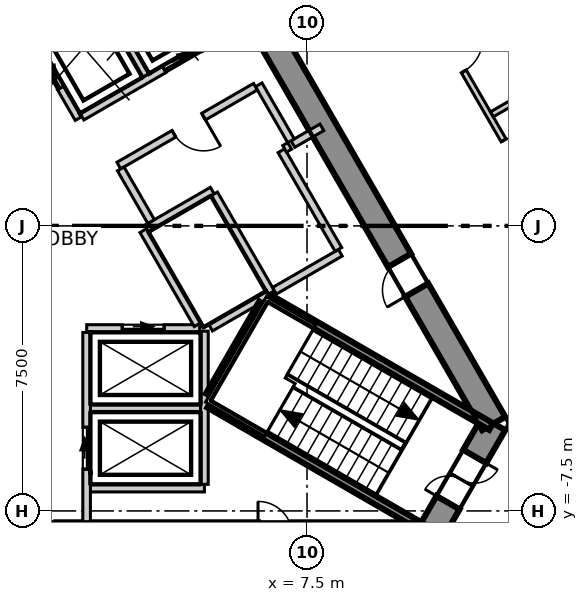
"""IFC4 building model, lengths in metres.
Left out: names, types, materials, properties, quantities, classifications, styles, units other than length and angle.
Written with IfcOpenShell. Run it as: python <this file> out.ifc"""

import sys

from ifc_helpers import new_model, si_unit, direction, frame, frame_2d, origin, place, context, subcontext, project, spatial, polyline, rectangle, outline, extrude, element, fill, save


model = new_model("IFC4")
c1 = context("Model", 3, precision=1e-05, world=origin(), true_north=direction((0.0, 1.0)))
c2 = subcontext(c1, "Body", "Model", "MODEL_VIEW")
j1 = project(units=[si_unit("LENGTHUNIT", "METRE"), si_unit("PLANEANGLEUNIT", "RADIAN")], contexts=[c1])
p1 = place(None, origin())
s1 = spatial("IfcSite", under=j1, at=p1, CompositionType="ELEMENT")
p2 = place(p1, origin())
s2 = spatial("IfcBuilding", under=s1, at=p2, CompositionType="ELEMENT")
p3 = place(p2, frame((0.0, 0.0, 215.3)))
s3 = spatial("IfcBuildingStorey", under=s2, at=p3, CompositionType="ELEMENT", Elevation=215.3)
p4 = place(p3, frame((-10.71, -8.15, -0.3), z_axis=(0.0, 0.0, 1.0), x_axis=(1.0, 0.0, 0.0)))
e1 = element("IfcWall", 1, at=p4, inside=s3, PredefinedType="SHEAR", context=c2, shape_type="SweptSolid", body=[
    extrude(outline(polyline([(-0.202, -0.35), (1.782, -0.35), (3.766, -0.35), (5.75, -0.35), (7.734, -0.35), (9.718, -0.35), (11.702, -0.35), (13.686, -0.35), (15.67, -0.35), (17.654, -0.35), (19.638, -0.35), (21.622, -0.35), (21.218, 0.35), (19.307, 0.35), (17.397, 0.35), (15.486, 0.35), (13.576, 0.35), (11.665, 0.35), (9.755, 0.35), (7.844, 0.35), (5.934, 0.35), (4.023, 0.35), (2.113, 0.35), (0.202, 0.35), (-0.202, -0.35)])), origin(), (0.0, 0.0, 1.0), 4.0),
])
p5 = place(p4, frame((9.81, 0.0, 0.3)))
e2 = element("IfcOpeningElement", 2, at=p5, cuts=e1, PredefinedType="OPENING", context=c2, shape_type="SweptSolid", body=[
    extrude(rectangle(XDim=1.8, YDim=2.1, at=frame_2d((0.9, 1.05))), frame((0.0, 0.36, 0.0), z_axis=(0.0, -1.0, 0.0), x_axis=(1.0, 0.0, 0.0)), (0.0, 0.0, 1.0), 0.72),
])
p6 = place(p4, frame((16.921, 0.0, 0.3)))
e3 = element("IfcOpeningElement", 3, at=p6, cuts=e1, PredefinedType="OPENING", context=c2, shape_type="SweptSolid", body=[
    extrude(rectangle(XDim=0.9, YDim=2.1, at=frame_2d((0.45, 1.05))), frame((0.0, 0.36, 0.0), z_axis=(0.0, -1.0, 0.0), x_axis=(1.0, 0.0, 0.0)), (0.0, 0.0, 1.0), 0.72),
])
p7 = place(p3, frame((10.71, -8.15, -0.3), z_axis=(0.0, 0.0, 1.0), x_axis=(0.49999337185, 0.866029230515, 0.0)))
e4 = element("IfcWall", 4, at=p7, inside=s3, PredefinedType="SHEAR", context=c2, shape_type="SweptSolid", body=[
    extrude(outline(polyline([(-0.202, -0.35), (1.703, -0.35), (3.608, -0.35), (3.204, 0.35), (1.703, 0.35), (0.202, 0.35), (-0.202, -0.35)])), origin(), (0.0, 0.0, 1.0), 4.0),
])
p8 = place(p7, frame((1.003, 0.0, 0.3)))
e5 = element("IfcOpeningElement", 5, at=p8, cuts=e4, PredefinedType="OPENING", context=c2, shape_type="SweptSolid", body=[
    extrude(rectangle(XDim=1.4, YDim=2.1, at=frame_2d((0.7, 1.05))), frame((0.0, 0.36, 0.0), z_axis=(0.0, -1.0, 0.0), x_axis=(1.0, 0.0, 0.0)), (0.0, 0.0, 1.0), 0.72),
])
p9 = place(p3, frame((12.413, -5.2, -0.3), z_axis=(0.0, 0.0, 1.0), x_axis=(-0.500011533395, 0.866018744874, 0.0)))
e6 = element("IfcWall", 6, at=p9, inside=s3, PredefinedType="SHEAR", context=c2, shape_type="SweptSolid", body=[
    extrude(outline(polyline([(-0.202, -0.35), (1.782, -0.35), (3.766, -0.35), (5.75, -0.35), (7.734, -0.35), (9.718, -0.35), (11.702, -0.35), (13.686, -0.35), (15.67, -0.35), (17.654, -0.35), (19.638, -0.35), (21.622, -0.35), (21.218, 0.35), (19.307, 0.35), (17.397, 0.35), (15.486, 0.35), (13.576, 0.35), (11.665, 0.35), (9.755, 0.35), (7.844, 0.35), (5.934, 0.35), (4.023, 0.35), (2.113, 0.35), (0.202, 0.35), (-0.202, -0.35)])), origin(), (0.0, 0.0, 1.0), 4.0),
])
p10 = place(p9, frame((4.055, 0.0, 0.3)))
e7 = element("IfcOpeningElement", 7, at=p10, cuts=e6, PredefinedType="OPENING", context=c2, shape_type="SweptSolid", body=[
    extrude(rectangle(XDim=0.9, YDim=2.1, at=frame_2d((0.45, 1.05))), frame((0.0, 0.36, 0.0), z_axis=(0.0, -1.0, 0.0), x_axis=(1.0, 0.0, 0.0)), (0.0, 0.0, 1.0), 0.72),
])
p11 = place(p9, frame((16.465, 0.0, 0.3)))
e8 = element("IfcOpeningElement", 8, at=p11, cuts=e6, PredefinedType="OPENING", context=c2, shape_type="SweptSolid", body=[
    extrude(rectangle(XDim=0.9, YDim=2.1, at=frame_2d((0.45, 1.05))), frame((0.0, 0.36, 0.0), z_axis=(0.0, -1.0, 0.0), x_axis=(1.0, 0.0, 0.0)), (0.0, 0.0, 1.0), 0.72),
])
p12 = place(p3, frame((28.243, -13.098, 0.0), z_axis=(0.0, 0.0, 1.0), x_axis=(-0.500001688958, 0.866024428662, 0.0)))
e9 = element("IfcWall", 9, at=p12, inside=s3, PredefinedType="ELEMENTEDWALL", context=c2, shape_type="SweptSolid", body=[
    extrude(rectangle(XDim=50.909, YDim=0.2, at=frame_2d((25.455, 0.0))), origin(), (0.0, 0.0, 1.0), 3.7),
])
p13 = place(p12, frame((2.223, 0.0, 0.9)))
e10 = element("IfcOpeningElement", 10, at=p13, cuts=e9, PredefinedType="OPENING", context=c2, shape_type="SweptSolid", body=[
    extrude(rectangle(XDim=4.2, YDim=2.5, at=frame_2d((2.1, 1.25))), frame((0.0, 0.11, 0.0), z_axis=(0.0, -1.0, 0.0), x_axis=(1.0, 0.0, 0.0)), (0.0, 0.0, 1.0), 0.22),
])
p14 = place(p12, frame((8.263, 0.0, 0.9)))
e11 = element("IfcOpeningElement", 11, at=p14, cuts=e9, PredefinedType="OPENING", context=c2, shape_type="SweptSolid", body=[
    extrude(rectangle(XDim=4.2, YDim=2.5, at=frame_2d((2.1, 1.25))), frame((0.0, 0.11, 0.0), z_axis=(0.0, -1.0, 0.0), x_axis=(1.0, 0.0, 0.0)), (0.0, 0.0, 1.0), 0.22),
])
p15 = place(p12, frame((14.304, 0.0, 0.9)))
e12 = element("IfcOpeningElement", 12, at=p15, cuts=e9, PredefinedType="OPENING", context=c2, shape_type="SweptSolid", body=[
    extrude(rectangle(XDim=4.2, YDim=2.5, at=frame_2d((2.1, 1.25))), frame((0.0, 0.11, 0.0), z_axis=(0.0, -1.0, 0.0), x_axis=(1.0, 0.0, 0.0)), (0.0, 0.0, 1.0), 0.22),
])
p16 = place(p12, frame((20.345, 0.0, 0.9)))
e13 = element("IfcOpeningElement", 13, at=p16, cuts=e9, PredefinedType="OPENING", context=c2, shape_type="SweptSolid", body=[
    extrude(rectangle(XDim=4.2, YDim=2.5, at=frame_2d((2.1, 1.25))), frame((0.0, 0.11, 0.0), z_axis=(0.0, -1.0, 0.0), x_axis=(1.0, 0.0, 0.0)), (0.0, 0.0, 1.0), 0.22),
])
p17 = place(p12, frame((26.385, 0.0, 0.9)))
e14 = element("IfcOpeningElement", 14, at=p17, cuts=e9, PredefinedType="OPENING", context=c2, shape_type="SweptSolid", body=[
    extrude(rectangle(XDim=4.2, YDim=2.5, at=frame_2d((2.1, 1.25))), frame((0.0, 0.11, 0.0), z_axis=(0.0, -1.0, 0.0), x_axis=(1.0, 0.0, 0.0)), (0.0, 0.0, 1.0), 0.22),
])
p18 = place(p12, frame((32.426, 0.0, 0.9)))
e15 = element("IfcOpeningElement", 15, at=p18, cuts=e9, PredefinedType="OPENING", context=c2, shape_type="SweptSolid", body=[
    extrude(rectangle(XDim=4.2, YDim=2.5, at=frame_2d((2.1, 1.25))), frame((0.0, 0.11, 0.0), z_axis=(0.0, -1.0, 0.0), x_axis=(1.0, 0.0, 0.0)), (0.0, 0.0, 1.0), 0.22),
])
p19 = place(p12, frame((38.466, 0.0, 0.9)))
e16 = element("IfcOpeningElement", 16, at=p19, cuts=e9, PredefinedType="OPENING", context=c2, shape_type="SweptSolid", body=[
    extrude(rectangle(XDim=4.2, YDim=2.5, at=frame_2d((2.1, 1.25))), frame((0.0, 0.11, 0.0), z_axis=(0.0, -1.0, 0.0), x_axis=(1.0, 0.0, 0.0)), (0.0, 0.0, 1.0), 0.22),
])
p20 = place(p12, frame((44.507, 0.0, 0.9)))
e17 = element("IfcOpeningElement", 17, at=p20, cuts=e9, PredefinedType="OPENING", context=c2, shape_type="SweptSolid", body=[
    extrude(rectangle(XDim=4.2, YDim=2.5, at=frame_2d((2.1, 1.25))), frame((0.0, 0.11, 0.0), z_axis=(0.0, -1.0, 0.0), x_axis=(1.0, 0.0, 0.0)), (0.0, 0.0, 1.0), 0.22),
])
p21 = place(p3, frame((0.075, 24.07, 0.0), z_axis=(0.0, 0.0, 1.0), x_axis=(0.500006834213, -0.866021458014, 0.0)))
e18 = element("IfcWall", 18, at=p21, inside=s3, PredefinedType="PARTITIONING", context=c2, shape_type="SweptSolid", body=[
    extrude(rectangle(XDim=41.616, YDim=0.15, at=frame_2d((20.808, 0.0))), origin(), (0.0, 0.0, 1.0), 3.7),
])
p22 = place(p21, frame((33.715, 0.0, 0.0)))
e19 = element("IfcOpeningElement", 19, at=p22, cuts=e18, PredefinedType="OPENING", context=c2, shape_type="SweptSolid", body=[
    extrude(rectangle(XDim=1.1, YDim=2.1, at=frame_2d((0.55, 1.05))), frame((0.0, 0.085, 0.0), z_axis=(0.0, -1.0, 0.0), x_axis=(1.0, 0.0, 0.0)), (0.0, 0.0, 1.0), 0.17),
])
p23 = place(p21, frame((22.098, 0.0, 0.0)))
e20 = element("IfcOpeningElement", 20, at=p23, cuts=e18, PredefinedType="OPENING", context=c2, shape_type="SweptSolid", body=[
    extrude(rectangle(XDim=1.0, YDim=2.1, at=frame_2d((0.5, 1.05))), frame((0.0, 0.085, 0.0), z_axis=(0.0, -1.0, 0.0), x_axis=(1.0, 0.0, 0.0)), (0.0, 0.0, 1.0), 0.17),
])
p24 = place(p21, frame((25.198, 0.0, 0.0)))
e21 = element("IfcOpeningElement", 21, at=p24, cuts=e18, PredefinedType="OPENING", context=c2, shape_type="SweptSolid", body=[
    extrude(rectangle(XDim=0.9, YDim=2.1, at=frame_2d((0.45, 1.05))), frame((0.0, 0.085, 0.0), z_axis=(0.0, -1.0, 0.0), x_axis=(1.0, 0.0, 0.0)), (0.0, 0.0, 1.0), 0.17),
])
p25 = place(p21, frame((9.858, 0.0, 0.0)))
e22 = element("IfcOpeningElement", 22, at=p25, cuts=e18, PredefinedType="OPENING", context=c2, shape_type="SweptSolid", body=[
    extrude(rectangle(XDim=1.1, YDim=2.1, at=frame_2d((0.55, 1.05))), frame((0.0, 0.085, 0.0), z_axis=(0.0, -1.0, 0.0), x_axis=(1.0, 0.0, 0.0)), (0.0, 0.0, 1.0), 0.17),
])
p26 = place(p21, frame((18.758, 0.0, 0.0)))
e23 = element("IfcOpeningElement", 23, at=p26, cuts=e18, PredefinedType="OPENING", context=c2, shape_type="SweptSolid", body=[
    extrude(rectangle(XDim=0.9, YDim=2.1, at=frame_2d((0.45, 1.05))), frame((0.0, 0.085, 0.0), z_axis=(0.0, -1.0, 0.0), x_axis=(1.0, 0.0, 0.0)), (0.0, 0.0, 1.0), 0.17),
])
p27 = place(p21, frame((15.558, 0.0, 0.0)))
e24 = element("IfcOpeningElement", 24, at=p27, cuts=e18, PredefinedType="OPENING", context=c2, shape_type="SweptSolid", body=[
    extrude(rectangle(XDim=0.9, YDim=2.1, at=frame_2d((0.45, 1.05))), frame((0.0, 0.085, 0.0), z_axis=(0.0, -1.0, 0.0), x_axis=(1.0, 0.0, 0.0)), (0.0, 0.0, 1.0), 0.17),
])
p28 = place(p21, frame((12.658, 0.0, 0.0)))
e25 = element("IfcOpeningElement", 25, at=p28, cuts=e18, PredefinedType="OPENING", context=c2, shape_type="SweptSolid", body=[
    extrude(rectangle(XDim=1.0, YDim=2.1, at=frame_2d((0.5, 1.05))), frame((0.0, 0.085, 0.0), z_axis=(0.0, -1.0, 0.0), x_axis=(1.0, 0.0, 0.0)), (0.0, 0.0, 1.0), 0.17),
])
p29 = place(p21, frame((3.776, 0.0, 0.0)))
e26 = element("IfcOpeningElement", 26, at=p29, cuts=e18, PredefinedType="OPENING", context=c2, shape_type="SweptSolid", body=[
    extrude(rectangle(XDim=1.1, YDim=2.1, at=frame_2d((0.55, 1.05))), frame((0.0, 0.085, 0.0), z_axis=(0.0, -1.0, 0.0), x_axis=(1.0, 0.0, 0.0)), (0.0, 0.0, 1.0), 0.17),
])
p30 = place(p3, frame((12.364, 2.935, 0.0), z_axis=(0.0, 0.0, 1.0), x_axis=(0.865965703354, 0.500103389924, 0.0)))
e27 = element("IfcWall", 27, at=p30, inside=s3, PredefinedType="PARTITIONING", context=c2, shape_type="SweptSolid", body=[
    extrude(rectangle(XDim=2.755, YDim=0.15, at=frame_2d((1.378, 0.0))), origin(), (0.0, 0.0, 1.0), 3.7),
])
p31 = place(p3, frame((1.8, -4.8, 0.0), z_axis=(0.0, 0.0, 1.0), x_axis=(1.0, 0.0, 0.0)))
e28 = element("IfcWall", 28, at=p31, inside=s3, PredefinedType="SOLIDWALL", context=c2, shape_type="SweptSolid", body=[
    extrude(rectangle(XDim=2.9, YDim=0.2, at=frame_2d((1.45, 0.0))), origin(), (0.0, 0.0, 1.0), 3.7),
])
p32 = place(p3, frame((1.8, -6.9, 0.0), z_axis=(0.0, 0.0, 1.0), x_axis=(1.0, 0.0, 0.0)))
e29 = element("IfcWall", 29, at=p32, inside=s3, PredefinedType="SOLIDWALL", context=c2, shape_type="SweptSolid", body=[
    extrude(rectangle(XDim=3.0, YDim=0.2, at=frame_2d((1.5, 0.0))), origin(), (0.0, 0.0, 1.0), 3.7),
])
p33 = place(p3, frame((1.703, -2.7, 0.0), z_axis=(0.0, 0.0, 1.0), x_axis=(1.0, 0.0, 0.0)))
e30 = element("IfcWall", 30, at=p33, inside=s3, PredefinedType="SOLIDWALL", context=c2, shape_type="SweptSolid", body=[
    extrude(rectangle(XDim=2.973, YDim=0.2, at=frame_2d((1.487, 0.0))), origin(), (0.0, 0.0, 1.0), 3.7),
])
p34 = place(p33, frame((0.936, 0.0, 0.0)))
e31 = element("IfcOpeningElement", 31, at=p34, cuts=e30, PredefinedType="OPENING", context=c2, shape_type="SweptSolid", body=[
    extrude(rectangle(XDim=1.1, YDim=2.1, at=frame_2d((0.55, 1.05))), frame((0.0, 0.11, 0.0), z_axis=(0.0, -1.0, 0.0), x_axis=(1.0, 0.0, 0.0)), (0.0, 0.0, 1.0), 0.22),
])
p35 = place(p3, frame((0.0, 5.4, 0.0), z_axis=(0.0, 0.0, 1.0), x_axis=(0.500103862429, -0.865965430478, 0.0)))
e32 = element("IfcWall", 32, at=p35, inside=s3, PredefinedType="SOLIDWALL", context=c2, shape_type="SweptSolid", body=[
    extrude(rectangle(XDim=2.973, YDim=0.2, at=frame_2d((1.487, 0.0))), origin(), (0.0, 0.0, 1.0), 3.7),
])
p36 = place(p35, frame((0.937, 0.0, 0.0)))
e33 = element("IfcOpeningElement", 33, at=p36, cuts=e32, PredefinedType="OPENING", context=c2, shape_type="SweptSolid", body=[
    extrude(rectangle(XDim=1.1, YDim=2.1, at=frame_2d((0.55, 1.05))), frame((0.0, 0.11, 0.0), z_axis=(0.0, -1.0, 0.0), x_axis=(1.0, 0.0, 0.0)), (0.0, 0.0, 1.0), 0.22),
])
p37 = place(p3, frame((3.19, -0.125, 0.0), z_axis=(0.0, 0.0, 1.0), x_axis=(0.499988658015, -0.866031951983, 0.0)))
e34 = element("IfcWall", 34, at=p37, inside=s3, PredefinedType="SOLIDWALL", context=c2, shape_type="SweptSolid", body=[
    extrude(rectangle(XDim=2.858, YDim=0.2, at=frame_2d((1.429, 0.0))), origin(), (0.0, 0.0, 1.0), 3.7),
])
p38 = place(p3, frame((1.578, 2.874, 0.0), z_axis=(0.0, 0.0, 1.0), x_axis=(0.866045911672, 0.499964477614, 0.0)))
e35 = element("IfcWall", 35, at=p38, inside=s3, PredefinedType="SOLIDWALL", context=c2, shape_type="SweptSolid", body=[
    extrude(rectangle(XDim=5.327, YDim=0.2, at=frame_2d((2.663, 0.0))), origin(), (0.0, 0.0, 1.0), 3.7),
])
p39 = place(p38, frame((2.496, 0.0, 0.0)))
e36 = element("IfcOpeningElement", 36, at=p39, cuts=e35, PredefinedType="OPENING", context=c2, shape_type="SweptSolid", body=[
    extrude(rectangle(XDim=1.1, YDim=2.1, at=frame_2d((0.55, 1.05))), frame((0.0, 0.11, 0.0), z_axis=(0.0, -1.0, 0.0), x_axis=(1.0, 0.0, 0.0)), (0.0, 0.0, 1.0), 0.22),
])
p40 = place(p3, frame((1.7, -8.13, 0.0), z_axis=(0.0, 0.0, 1.0), x_axis=(0.0, 1.0, 0.0)))
e37 = element("IfcWall", 37, at=p40, inside=s3, PredefinedType="SOLIDWALL", context=c2, shape_type="SweptSolid", body=[
    extrude(rectangle(XDim=5.327, YDim=0.2, at=frame_2d((2.664, 0.0))), origin(), (0.0, 0.0, 1.0), 3.7),
])
p41 = place(p40, frame((1.73, 0.0, 0.0)))
e38 = element("IfcOpeningElement", 38, at=p41, cuts=e37, PredefinedType="OPENING", context=c2, shape_type="SweptSolid", body=[
    extrude(rectangle(XDim=1.1, YDim=2.1, at=frame_2d((0.55, 1.05))), frame((0.0, 0.11, 0.0), z_axis=(0.0, -1.0, 0.0), x_axis=(1.0, 0.0, 0.0)), (0.0, 0.0, 1.0), 0.22),
])
p42 = place(p3, frame((4.8, -6.8, 0.0), z_axis=(0.0, 0.0, 1.0), x_axis=(0.0, 1.0, 0.0)))
e39 = element("IfcWall", 39, at=p42, inside=s3, PredefinedType="SOLIDWALL", context=c2, shape_type="SweptSolid", body=[
    extrude(rectangle(XDim=4.031, YDim=0.2, at=frame_2d((2.016, 0.0))), origin(), (0.0, 0.0, 1.0), 3.7),
])
p43 = place(p3, frame((3.278, -0.071, 0.0), z_axis=(0.0, 0.0, 1.0), x_axis=(0.865855657918, 0.500293893279, 0.0)))
e40 = element("IfcWall", 40, at=p43, inside=s3, PredefinedType="SOLIDWALL", context=c2, shape_type="SweptSolid", body=[
    extrude(rectangle(XDim=1.997, YDim=0.2, at=frame_2d((0.999, 0.0))), origin(), (0.0, 0.0, 1.0), 3.7),
])
p44 = place(p3, frame((7.129, 2.153, 0.0), z_axis=(0.0, 0.0, 1.0), x_axis=(0.866083962871, 0.499898558967, 0.0)))
e41 = element("IfcWall", 41, at=p44, inside=s3, PredefinedType="SOLIDWALL", context=c2, shape_type="SweptSolid", body=[
    extrude(rectangle(XDim=0.88, YDim=0.2, at=frame_2d((0.44, 0.0))), origin(), (0.0, 0.0, 1.0), 3.7),
])
p45 = place(p3, frame((1.807, 6.47, 0.0), z_axis=(0.0, 0.0, 1.0), x_axis=(0.50012328804, -0.865954211699, 0.0)))
e42 = element("IfcWall", 42, at=p45, inside=s3, PredefinedType="SOLIDWALL", context=c2, shape_type="SweptSolid", body=[
    extrude(rectangle(XDim=2.9, YDim=0.2, at=frame_2d((1.45, 0.0))), origin(), (0.0, 0.0, 1.0), 3.7),
])
p46 = place(p3, frame((5.057, 0.841, 0.0), z_axis=(0.0, 0.0, 1.0), x_axis=(0.499990139034, -0.866031096941, 0.0)))
e43 = element("IfcWall", 43, at=p46, inside=s3, PredefinedType="SOLIDWALL", context=c2, shape_type="SweptSolid", body=[
    extrude(rectangle(XDim=3.0, YDim=0.2, at=frame_2d((1.5, 0.0))), origin(), (0.0, 0.0, 1.0), 3.7),
])
p47 = place(p3, frame((4.963, -2.677, 0.0), z_axis=(0.0, 0.0, 1.0), x_axis=(0.866024383922, 0.50000176645, 0.0)))
e44 = element("IfcWall", 44, at=p47, inside=s3, PredefinedType="SOLIDWALL", context=c2, shape_type="SweptSolid", body=[
    extrude(rectangle(XDim=1.74, YDim=0.2, at=frame_2d((0.87, 0.0))), origin(), (0.0, 0.0, 1.0), 3.7),
])
p48 = place(p3, frame((6.229, 3.712, 0.0), z_axis=(0.0, 0.0, 1.0), x_axis=(0.499875724984, -0.86609714211, 0.0)))
e45 = element("IfcWall", 45, at=p48, inside=s3, PredefinedType="SOLIDWALL", context=c2, shape_type="SweptSolid", body=[
    extrude(rectangle(XDim=1.701, YDim=0.2, at=frame_2d((0.85, 0.0))), origin(), (0.0, 0.0, 1.0), 3.7),
])
p49 = place(p3, frame((2.548, 1.587, 0.0), z_axis=(0.0, 0.0, 1.0), x_axis=(0.866004344652, 0.500036473714, 0.0)))
e46 = element("IfcWall", 46, at=p49, inside=s3, PredefinedType="SOLIDWALL", context=c2, shape_type="SweptSolid", body=[
    extrude(rectangle(XDim=4.15, YDim=0.2, at=frame_2d((2.075, 0.0))), origin(), (0.0, 0.0, 1.0), 3.7),
])
p50 = place(p49, frame((1.675, 0.0, 0.0)))
e47 = element("IfcOpeningElement", 47, at=p50, cuts=e46, PredefinedType="OPENING", context=c2, shape_type="SweptSolid", body=[
    extrude(rectangle(XDim=0.9, YDim=2.1, at=frame_2d((0.45, 1.05))), frame((0.0, 0.11, 0.0), z_axis=(0.0, -1.0, 0.0), x_axis=(1.0, 0.0, 0.0)), (0.0, 0.0, 1.0), 0.22),
])
p51 = place(p3, frame((2.598, 1.5, 0.0), z_axis=(0.0, 0.0, 1.0), x_axis=(0.499929347863, -0.866066190972, 0.0)))
e48 = element("IfcWall", 48, at=p51, inside=s3, PredefinedType="SOLIDWALL", context=c2, shape_type="SweptSolid", body=[
    extrude(rectangle(XDim=1.6, YDim=0.2, at=frame_2d((0.8, 0.0))), origin(), (0.0, 0.0, 1.0), 3.7),
])
p52 = place(p3, frame((6.642, -1.708, 0.0), z_axis=(0.0, 0.0, 1.0), x_axis=(0.866043441391, 0.499968756647, 0.0)))
e49 = element("IfcWall", 49, at=p52, inside=s3, PredefinedType="SOLIDWALL", context=c2, shape_type="SweptSolid", body=[
    extrude(rectangle(XDim=2.002, YDim=0.2, at=frame_2d((1.001, 0.0))), origin(), (0.0, 0.0, 1.0), 3.7),
])
p53 = place(p3, frame((6.826, 1.978, 0.0), z_axis=(0.0, 0.0, 1.0), x_axis=(0.499990139034, -0.866031096941, 0.0)))
e50 = element("IfcWall", 50, at=p53, inside=s3, PredefinedType="SOLIDWALL", context=c2, shape_type="SweptSolid", body=[
    extrude(rectangle(XDim=3.0, YDim=0.2, at=frame_2d((1.5, 0.0))), origin(), (0.0, 0.0, 1.0), 3.7),
])
p54 = place(p3, frame((6.912, 2.028, 0.0), z_axis=(0.0, 0.0, 1.0), x_axis=(0.866559367082, 0.499074005857, 0.0)))
e51 = element("IfcWall", 51, at=p54, inside=s3, PredefinedType="SOLIDWALL", context=c2, shape_type="SweptSolid", body=[
    extrude(rectangle(XDim=0.152, YDim=0.2, at=frame_2d((0.076, 0.0))), origin(), (0.0, 0.0, 1.0), 3.7),
])
p55 = place(p3, frame((4.929, -4.462, 0.0), z_axis=(0.0, 0.0, 1.0), x_axis=(0.500200581029, 0.865909567298, 0.0)))
e52 = element("IfcWall", 52, at=p55, inside=s3, PredefinedType="SOLIDWALL", context=c2, shape_type="SweptSolid", body=[
    extrude(rectangle(XDim=2.799, YDim=0.2, at=frame_2d((1.399, 0.0))), origin(), (0.0, 0.0, 1.0), 3.7),
])
p56 = place(p3, frame((6.529, -1.922, 0.0), z_axis=(0.0, 0.0, 1.0), x_axis=(0.866046323291, -0.499963764601, 0.0)))
e53 = element("IfcWall", 53, at=p56, inside=s3, PredefinedType="SOLIDWALL", context=c2, shape_type="SweptSolid", body=[
    extrude(rectangle(XDim=6.714, YDim=0.2, at=frame_2d((3.357, 0.0))), origin(), (0.0, 0.0, 1.0), 3.7),
])
p57 = place(p3, frame((4.929, -4.693, 0.0), z_axis=(0.0, 0.0, 1.0), x_axis=(0.865983344943, -0.500072840975, 0.0)))
e54 = element("IfcWall", 54, at=p57, inside=s3, PredefinedType="SOLIDWALL", context=c2, shape_type="SweptSolid", body=[
    extrude(rectangle(XDim=6.715, YDim=0.2, at=frame_2d((3.357, 0.0))), origin(), (0.0, 0.0, 1.0), 3.7),
])
p58 = place(p34, origin())
e55 = element("IfcDoor", 55, at=p58, inside=s3, OperationType="SLIDING_TO_LEFT", PredefinedType="DOOR", context=c2, shape_type="SweptSolid", body=[
    extrude(rectangle(XDim=1.1, YDim=2.1, at=frame_2d((0.55, 1.05))), frame((0.0, 0.025, 0.0), z_axis=(0.0, -1.0, 0.0), x_axis=(1.0, 0.0, 0.0)), (0.0, 0.0, 1.0), 0.05),
])
fill(e31, e55)
p59 = place(p41, origin())
e56 = element("IfcDoor", 56, at=p59, inside=s3, OperationType="SLIDING_TO_LEFT", PredefinedType="DOOR", context=c2, shape_type="SweptSolid", body=[
    extrude(rectangle(XDim=1.1, YDim=2.1, at=frame_2d((0.55, 1.05))), frame((0.0, 0.025, 0.0), z_axis=(0.0, -1.0, 0.0), x_axis=(1.0, 0.0, 0.0)), (0.0, 0.0, 1.0), 0.05),
])
fill(e38, e56)
p60 = place(p36, origin())
e57 = element("IfcDoor", 57, at=p60, inside=s3, OperationType="SLIDING_TO_LEFT", PredefinedType="DOOR", context=c2, shape_type="SweptSolid", body=[
    extrude(rectangle(XDim=1.1, YDim=2.1, at=frame_2d((0.55, 1.05))), frame((0.0, 0.025, 0.0), z_axis=(0.0, -1.0, 0.0), x_axis=(1.0, 0.0, 0.0)), (0.0, 0.0, 1.0), 0.05),
])
fill(e33, e57)
p61 = place(p39, origin())
e58 = element("IfcDoor", 58, at=p61, inside=s3, OperationType="SLIDING_TO_LEFT", PredefinedType="DOOR", context=c2, shape_type="SweptSolid", body=[
    extrude(rectangle(XDim=1.1, YDim=2.1, at=frame_2d((0.55, 1.05))), frame((0.0, 0.025, 0.0), z_axis=(0.0, -1.0, 0.0), x_axis=(1.0, 0.0, 0.0)), (0.0, 0.0, 1.0), 0.05),
])
fill(e36, e58)
p62 = place(p23, origin())
e59 = element("IfcDoor", 59, at=p62, inside=s3, OperationType="SINGLE_SWING_RIGHT", PredefinedType="DOOR", context=c2, shape_type="SweptSolid", body=[
    extrude(rectangle(XDim=1.0, YDim=2.1, at=frame_2d((0.5, 1.05))), frame((0.0, 0.025, 0.0), z_axis=(0.0, -1.0, 0.0), x_axis=(1.0, 0.0, 0.0)), (0.0, 0.0, 1.0), 0.05),
])
fill(e20, e59)
p63 = place(p24, origin())
e60 = element("IfcDoor", 60, at=p63, inside=s3, OperationType="SINGLE_SWING_LEFT", PredefinedType="DOOR", context=c2, shape_type="SweptSolid", body=[
    extrude(rectangle(XDim=0.9, YDim=2.1, at=frame_2d((0.45, 1.05))), frame((0.0, 0.025, 0.0), z_axis=(0.0, -1.0, 0.0), x_axis=(1.0, 0.0, 0.0)), (0.0, 0.0, 1.0), 0.05),
])
fill(e21, e60)
p64 = place(p8, origin())
e61 = element("IfcDoor", 61, at=p64, inside=s3, OperationType="DOUBLE_DOOR_SINGLE_SWING", PredefinedType="DOOR", context=c2, shape_type="SweptSolid", body=[
    extrude(rectangle(XDim=1.4, YDim=2.1, at=frame_2d((0.7, 1.05))), frame((0.0, 0.025, 0.0), z_axis=(0.0, -1.0, 0.0), x_axis=(1.0, 0.0, 0.0)), (0.0, 0.0, 1.0), 0.05),
])
fill(e5, e61)
p65 = place(p10, origin())
e62 = element("IfcDoor", 62, at=p65, inside=s3, OperationType="SINGLE_SWING_RIGHT", PredefinedType="DOOR", context=c2, shape_type="SweptSolid", body=[
    extrude(rectangle(XDim=0.9, YDim=2.1, at=frame_2d((0.45, 1.05))), frame((0.0, 0.025, 0.0), z_axis=(0.0, -1.0, 0.0), x_axis=(1.0, 0.0, 0.0)), (0.0, 0.0, 1.0), 0.05),
])
fill(e7, e62)
p66 = place(p50, origin())
e63 = element("IfcDoor", 63, at=p66, inside=s3, OperationType="SINGLE_SWING_RIGHT", PredefinedType="DOOR", context=c2, shape_type="SweptSolid", body=[
    extrude(rectangle(XDim=0.9, YDim=2.1, at=frame_2d((0.45, 1.05))), frame((0.0, 0.025, 0.0), z_axis=(0.0, -1.0, 0.0), x_axis=(1.0, 0.0, 0.0)), (0.0, 0.0, 1.0), 0.05),
])
fill(e47, e63)
save(model, sys.argv[1])
